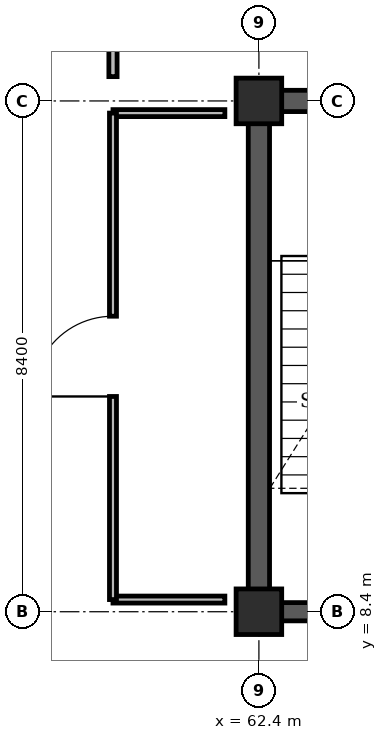
"""IFC4 building model, lengths in metres.
Left out: names, types, materials, properties, quantities, classifications, styles, units other than length and angle.
Written with IfcOpenShell. Run it as: python <this file> out.ifc"""

import sys

from ifc_helpers import new_model, si_unit, direction, frame, frame_2d, origin, origin_2d, place, context, subcontext, project, spatial, rectangle, extrude, element, fill, save


model = new_model("IFC4")
c1 = context("Model", 3, precision=1e-05, world=origin(), true_north=direction((0.0, 1.0)))
c2 = subcontext(c1, "Body", "Model", "MODEL_VIEW")
j1 = project(units=[si_unit("LENGTHUNIT", "METRE"), si_unit("PLANEANGLEUNIT", "RADIAN")], contexts=[c1])
p1 = place(None, origin())
s1 = spatial("IfcSite", under=j1, at=p1, CompositionType="ELEMENT")
p2 = place(p1, origin())
s2 = spatial("IfcBuilding", under=s1, at=p2, CompositionType="ELEMENT")
p3 = place(p2, frame((0.0, 0.0, 9.6)))
s3 = spatial("IfcBuildingStorey", under=s2, at=p3, CompositionType="ELEMENT", Elevation=9.6)
p4 = place(p3, frame((62.225, 16.8, 0.0), z_axis=(0.0, 0.0, 1.0), x_axis=(1.0, 0.0, 0.0)))
e1 = element("IfcWall", 1, at=p4, inside=s3, PredefinedType="SHEAR", context=c2, shape_type="SweptSolid", body=[
    extrude(rectangle(XDim=8.15, YDim=0.35, at=frame_2d((4.075, 0.0))), origin(), (0.0, 0.0, 1.0), 4.48),
])
p5 = place(p3, frame((62.4, 8.4, 0.0), z_axis=(0.0, 0.0, 1.0), x_axis=(0.0, 1.0, 0.0)))
e2 = element("IfcWall", 2, at=p5, inside=s3, PredefinedType="SHEAR", context=c2, shape_type="SweptSolid", body=[
    extrude(rectangle(XDim=8.4, YDim=0.35, at=frame_2d((4.2, 0.0))), origin(), (0.0, 0.0, 1.0), 4.48),
])
for number, where, z_axis, x_axis in (
    (3, (62.4, 8.4, 0.0), (0.0, 0.0, 1.0), (1.0, 0.0, 0.0)),
    (4, (62.4, 16.8, 0.0), (0.0, 0.0, 1.0), (1.0, 0.0, 0.0)),
):
    element("IfcColumn", number, at=place(p3, frame(where, z_axis=z_axis, x_axis=x_axis)), inside=s3, PredefinedType="COLUMN", context=c2, shape_type="SweptSolid", body=[
        extrude(rectangle(XDim=0.75, YDim=0.75, at=origin_2d()), origin(), (0.0, 0.0, 1.0), 4.8),
    ])
p6 = place(p3, frame((62.4, 8.4, 0.0), z_axis=(0.0, 0.0, 1.0), x_axis=(1.0, 0.0, 0.0)))
e5 = element("IfcWall", 5, at=p6, inside=s3, PredefinedType="SHEAR", context=c2, shape_type="SweptSolid", body=[
    extrude(rectangle(XDim=4.15, YDim=0.3, at=frame_2d((2.075, 0.0))), origin(), (0.0, 0.0, 1.0), 4.8),
])
p7 = place(p6, frame((1.515, 0.0, 0.0)))
e6 = element("IfcOpeningElement", 6, at=p7, cuts=e5, PredefinedType="OPENING", context=c2, shape_type="SweptSolid", body=[
    extrude(rectangle(XDim=1.12, YDim=2.15, at=frame_2d((0.56, 1.075))), frame((0.0, 0.16, 0.0), z_axis=(0.0, -1.0, 0.0), x_axis=(1.0, 0.0, 0.0)), (0.0, 0.0, 1.0), 0.32),
])
for number, where, z_axis, x_axis in (
    (7, (60.0, 8.6, 0.0), (0.0, 0.0, 1.0), (1.0, 0.0, 0.0)),
    (8, (60.0, 16.6, 0.0), (0.0, 0.0, 1.0), (1.0, 0.0, 0.0)),
):
    element("IfcWall", number, at=place(p3, frame(where, z_axis=z_axis, x_axis=x_axis)), inside=s3, PredefinedType="PARTITIONING", context=c2, shape_type="SweptSolid", body=[
        extrude(rectangle(XDim=1.84, YDim=0.115, at=frame_2d((0.92, 0.0))), origin(), (0.0, 0.0, 1.0), 3.73),
    ])
p8 = place(p3, frame((60.0, 8.6, 0.0), z_axis=(0.0, 0.0, 1.0), x_axis=(0.0, 1.0, 0.0)))
e9 = element("IfcWall", 9, at=p8, inside=s3, PredefinedType="PARTITIONING", context=c2, shape_type="SweptSolid", body=[
    extrude(rectangle(XDim=8.0, YDim=0.115, at=frame_2d((4.0, 0.0))), origin(), (0.0, 0.0, 1.0), 4.46),
])
p9 = place(p8, frame((3.34, 0.0, 0.0)))
e10 = element("IfcOpeningElement", 10, at=p9, cuts=e9, PredefinedType="OPENING", context=c2, shape_type="SweptSolid", body=[
    extrude(rectangle(XDim=1.32, YDim=2.15, at=frame_2d((0.66, 1.075))), frame((0.0, 0.067, 0.0), z_axis=(0.0, -1.0, 0.0), x_axis=(1.0, 0.0, 0.0)), (0.0, 0.0, 1.0), 0.135),
])
p10 = place(p3, frame((60.0, 17.2, 0.0), z_axis=(0.0, 0.0, 1.0), x_axis=(0.0, 1.0, 0.0)))
e11 = element("IfcWall", 11, at=p10, inside=s3, PredefinedType="PARTITIONING", context=c2, shape_type="SweptSolid", body=[
    extrude(rectangle(XDim=7.6, YDim=0.135, at=frame_2d((3.8, 0.0))), origin(), (0.0, 0.0, 1.0), 4.46),
])
p11 = place(p10, frame((3.2, 0.0, 0.0)))
e12 = element("IfcOpeningElement", 12, at=p11, cuts=e11, PredefinedType="OPENING", context=c2, shape_type="SweptSolid", body=[
    extrude(rectangle(XDim=1.2, YDim=2.15, at=frame_2d((0.6, 1.075))), frame((0.0, 0.078, 0.0), z_axis=(0.0, -1.0, 0.0), x_axis=(1.0, 0.0, 0.0)), (0.0, 0.0, 1.0), 0.155),
])
p12 = place(p9, origin())
e13 = element("IfcDoor", 13, at=p12, inside=s3, OperationType="SINGLE_SWING_LEFT", PredefinedType="DOOR", context=c2, shape_type="SweptSolid", body=[
    extrude(rectangle(XDim=1.32, YDim=2.15, at=frame_2d((0.66, 1.075))), frame((0.0, 0.025, 0.0), z_axis=(0.0, -1.0, 0.0), x_axis=(1.0, 0.0, 0.0)), (0.0, 0.0, 1.0), 0.05),
])
fill(e10, e13)
save(model, sys.argv[1])
